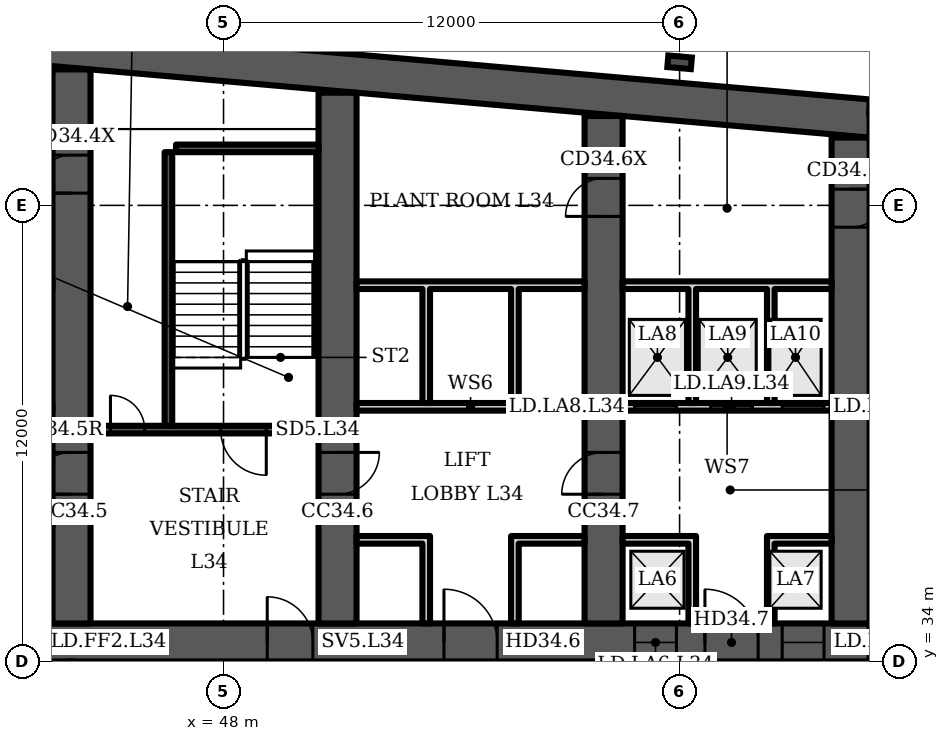
"""IFC4 building model, lengths in metres.
Left out: names, types, materials, properties, quantities, classifications, styles, units other than length and angle.
Written with IfcOpenShell. Run it as: python <this file> out.ifc"""

import sys

from ifc_helpers import new_model, si_unit, direction, frame, frame_2d, origin, origin_2d, place, context, subcontext, project, spatial, polyline, rectangle, i_section, outline, extrude, element, fill, save


model = new_model("IFC4")
c1 = context("Model", 3, precision=1e-05, world=origin(), true_north=direction((0.0, 1.0)))
c2 = subcontext(c1, "Body", "Model", "MODEL_VIEW")
j1 = project(units=[si_unit("LENGTHUNIT", "METRE"), si_unit("PLANEANGLEUNIT", "RADIAN")], contexts=[c1])
p1 = place(None, origin())
s1 = spatial("IfcSite", under=j1, at=p1, CompositionType="ELEMENT")
p2 = place(p1, origin())
s2 = spatial("IfcBuilding", under=s1, at=p2, CompositionType="ELEMENT")
p3 = place(p2, frame((0.0, 0.0, 143.5)))
s3 = spatial("IfcBuildingStorey", under=s2, at=p3, CompositionType="ELEMENT", Elevation=143.5)
p4 = place(p3, origin())
e1 = element("IfcWall", 1, at=p4, inside=s3, PredefinedType="SHEAR", context=c2, shape_type="SweptSolid", body=[
    extrude(outline(polyline([(16.0, 47.784), (40.5, 49.927), (65.0, 47.784), (65.0, 48.787), (40.5, 50.931), (16.0, 48.787), (16.0, 47.784)])), origin(), (0.0, 0.0, 1.0), 3.6),
])
p5 = place(p3, frame((16.0, 34.5, 0.0), z_axis=(0.0, 0.0, 1.0), x_axis=(1.0, 0.0, 0.0)))
e2 = element("IfcWall", 2, at=p5, inside=s3, PredefinedType="SHEAR", context=c2, shape_type="SweptSolid", body=[
    extrude(rectangle(XDim=49.0, YDim=1.0, at=frame_2d((24.5, 0.0))), origin(), (0.0, 0.0, 1.0), 3.6),
])
p6 = place(p5, frame((1.2, 0.0, 0.0)))
e3 = element("IfcOpeningElement", 3, at=p6, cuts=e2, PredefinedType="OPENING", context=c2, shape_type="SweptSolid", body=[
    extrude(rectangle(XDim=1.1, YDim=2.1, at=frame_2d((0.55, 1.05))), frame((0.0, 0.51, 0.0), z_axis=(0.0, -1.0, 0.0), x_axis=(1.0, 0.0, 0.0)), (0.0, 0.0, 1.0), 1.02),
])
p7 = place(p5, frame((5.083, 0.0, 0.0)))
e4 = element("IfcOpeningElement", 4, at=p7, cuts=e2, PredefinedType="OPENING", context=c2, shape_type="SweptSolid", body=[
    extrude(rectangle(XDim=1.1, YDim=2.1, at=frame_2d((0.55, 1.05))), frame((0.0, 0.51, 0.0), z_axis=(0.0, -1.0, 0.0), x_axis=(1.0, 0.0, 0.0)), (0.0, 0.0, 1.0), 1.02),
])
p8 = place(p5, frame((2.933, 0.0, 0.0)))
e5 = element("IfcOpeningElement", 5, at=p8, cuts=e2, PredefinedType="OPENING", context=c2, shape_type="SweptSolid", body=[
    extrude(rectangle(XDim=1.4, YDim=2.1, at=frame_2d((0.7, 1.05))), frame((0.0, 0.51, 0.0), z_axis=(0.0, -1.0, 0.0), x_axis=(1.0, 0.0, 0.0)), (0.0, 0.0, 1.0), 1.02),
])
p9 = place(p5, frame((7.65, 0.0, 0.0)))
e6 = element("IfcOpeningElement", 6, at=p9, cuts=e2, PredefinedType="OPENING", context=c2, shape_type="SweptSolid", body=[
    extrude(rectangle(XDim=1.2, YDim=2.1, at=frame_2d((0.6, 1.05))), frame((0.0, 0.51, 0.0), z_axis=(0.0, -1.0, 0.0), x_axis=(1.0, 0.0, 0.0)), (0.0, 0.0, 1.0), 1.02),
])
p10 = place(p5, frame((14.817, 0.0, 0.0)))
e7 = element("IfcOpeningElement", 7, at=p10, cuts=e2, PredefinedType="OPENING", context=c2, shape_type="SweptSolid", body=[
    extrude(rectangle(XDim=1.1, YDim=2.1, at=frame_2d((0.55, 1.05))), frame((0.0, 0.51, 0.0), z_axis=(0.0, -1.0, 0.0), x_axis=(1.0, 0.0, 0.0)), (0.0, 0.0, 1.0), 1.02),
])
p11 = place(p5, frame((19.083, 0.0, 0.0)))
e8 = element("IfcOpeningElement", 8, at=p11, cuts=e2, PredefinedType="OPENING", context=c2, shape_type="SweptSolid", body=[
    extrude(rectangle(XDim=1.1, YDim=2.1, at=frame_2d((0.55, 1.05))), frame((0.0, 0.51, 0.0), z_axis=(0.0, -1.0, 0.0), x_axis=(1.0, 0.0, 0.0)), (0.0, 0.0, 1.0), 1.02),
])
p12 = place(p5, frame((16.8, 0.0, 0.0)))
e9 = element("IfcOpeningElement", 9, at=p12, cuts=e2, PredefinedType="OPENING", context=c2, shape_type="SweptSolid", body=[
    extrude(rectangle(XDim=1.4, YDim=2.1, at=frame_2d((0.7, 1.05))), frame((0.0, 0.51, 0.0), z_axis=(0.0, -1.0, 0.0), x_axis=(1.0, 0.0, 0.0)), (0.0, 0.0, 1.0), 1.02),
])
p13 = place(p5, frame((21.817, 0.0, 0.0)))
e10 = element("IfcOpeningElement", 10, at=p13, cuts=e2, PredefinedType="OPENING", context=c2, shape_type="SweptSolid", body=[
    extrude(rectangle(XDim=1.1, YDim=2.1, at=frame_2d((0.55, 1.05))), frame((0.0, 0.51, 0.0), z_axis=(0.0, -1.0, 0.0), x_axis=(1.0, 0.0, 0.0)), (0.0, 0.0, 1.0), 1.02),
])
p14 = place(p5, frame((26.083, 0.0, 0.0)))
e11 = element("IfcOpeningElement", 11, at=p14, cuts=e2, PredefinedType="OPENING", context=c2, shape_type="SweptSolid", body=[
    extrude(rectangle(XDim=1.1, YDim=2.1, at=frame_2d((0.55, 1.05))), frame((0.0, 0.51, 0.0), z_axis=(0.0, -1.0, 0.0), x_axis=(1.0, 0.0, 0.0)), (0.0, 0.0, 1.0), 1.02),
])
p15 = place(p5, frame((33.15, 0.0, 0.0)))
e12 = element("IfcOpeningElement", 12, at=p15, cuts=e2, PredefinedType="OPENING", context=c2, shape_type="SweptSolid", body=[
    extrude(rectangle(XDim=1.2, YDim=2.1, at=frame_2d((0.6, 1.05))), frame((0.0, 0.51, 0.0), z_axis=(0.0, -1.0, 0.0), x_axis=(1.0, 0.0, 0.0)), (0.0, 0.0, 1.0), 1.02),
])
p16 = place(p5, frame((37.8, 0.0, 0.0)))
e13 = element("IfcOpeningElement", 13, at=p16, cuts=e2, PredefinedType="OPENING", context=c2, shape_type="SweptSolid", body=[
    extrude(rectangle(XDim=1.4, YDim=2.1, at=frame_2d((0.7, 1.05))), frame((0.0, 0.51, 0.0), z_axis=(0.0, -1.0, 0.0), x_axis=(1.0, 0.0, 0.0)), (0.0, 0.0, 1.0), 1.02),
])
p17 = place(p5, frame((42.817, 0.0, 0.0)))
e14 = element("IfcOpeningElement", 14, at=p17, cuts=e2, PredefinedType="OPENING", context=c2, shape_type="SweptSolid", body=[
    extrude(rectangle(XDim=1.1, YDim=2.1, at=frame_2d((0.55, 1.05))), frame((0.0, 0.51, 0.0), z_axis=(0.0, -1.0, 0.0), x_axis=(1.0, 0.0, 0.0)), (0.0, 0.0, 1.0), 1.02),
])
p18 = place(p5, frame((46.7, 0.0, 0.0)))
e15 = element("IfcOpeningElement", 15, at=p18, cuts=e2, PredefinedType="OPENING", context=c2, shape_type="SweptSolid", body=[
    extrude(rectangle(XDim=1.1, YDim=2.1, at=frame_2d((0.55, 1.05))), frame((0.0, 0.51, 0.0), z_axis=(0.0, -1.0, 0.0), x_axis=(1.0, 0.0, 0.0)), (0.0, 0.0, 1.0), 1.02),
])
p19 = place(p5, frame((44.667, 0.0, 0.0)))
e16 = element("IfcOpeningElement", 16, at=p19, cuts=e2, PredefinedType="OPENING", context=c2, shape_type="SweptSolid", body=[
    extrude(rectangle(XDim=1.4, YDim=2.1, at=frame_2d((0.7, 1.05))), frame((0.0, 0.51, 0.0), z_axis=(0.0, -1.0, 0.0), x_axis=(1.0, 0.0, 0.0)), (0.0, 0.0, 1.0), 1.02),
])
p20 = place(p3, frame((44.0, 35.0, 0.0), z_axis=(0.0, 0.0, 1.0), x_axis=(0.0, 1.0, 0.0)))
e17 = element("IfcWall", 17, at=p20, inside=s3, PredefinedType="SHEAR", context=c2, shape_type="SweptSolid", body=[
    extrude(rectangle(XDim=14.577, YDim=1.0, at=frame_2d((7.289, 0.0))), origin(), (0.0, 0.0, 1.0), 3.6),
])
p21 = place(p20, frame((11.322, 0.0, 0.0)))
e18 = element("IfcOpeningElement", 18, at=p21, cuts=e17, PredefinedType="OPENING", context=c2, shape_type="SweptSolid", body=[
    extrude(rectangle(XDim=1.0, YDim=2.1, at=frame_2d((0.5, 1.05))), frame((0.0, 0.51, 0.0), z_axis=(0.0, -1.0, 0.0), x_axis=(1.0, 0.0, 0.0)), (0.0, 0.0, 1.0), 1.02),
])
p22 = place(p20, frame((3.4, 0.0, 0.0)))
e19 = element("IfcOpeningElement", 19, at=p22, cuts=e17, PredefinedType="OPENING", context=c2, shape_type="SweptSolid", body=[
    extrude(rectangle(XDim=1.1, YDim=2.1, at=frame_2d((0.55, 1.05))), frame((0.0, 0.51, 0.0), z_axis=(0.0, -1.0, 0.0), x_axis=(1.0, 0.0, 0.0)), (0.0, 0.0, 1.0), 1.02),
])
p23 = place(p3, frame((51.0, 35.0, 0.0), z_axis=(0.0, 0.0, 1.0), x_axis=(0.0, 1.0, 0.0)))
e20 = element("IfcWall", 20, at=p23, inside=s3, PredefinedType="SHEAR", context=c2, shape_type="SweptSolid", body=[
    extrude(rectangle(XDim=13.965, YDim=1.0, at=frame_2d((6.982, 0.0))), origin(), (0.0, 0.0, 1.0), 3.6),
])
p24 = place(p23, frame((3.4, 0.0, 0.0)))
e21 = element("IfcOpeningElement", 21, at=p24, cuts=e20, PredefinedType="OPENING", context=c2, shape_type="SweptSolid", body=[
    extrude(rectangle(XDim=1.1, YDim=2.1, at=frame_2d((0.55, 1.05))), frame((0.0, 0.51, 0.0), z_axis=(0.0, -1.0, 0.0), x_axis=(1.0, 0.0, 0.0)), (0.0, 0.0, 1.0), 1.02),
])
p25 = place(p3, frame((58.0, 35.0, 0.0), z_axis=(0.0, 0.0, 1.0), x_axis=(0.0, 1.0, 0.0)))
e22 = element("IfcWall", 22, at=p25, inside=s3, PredefinedType="SHEAR", context=c2, shape_type="SweptSolid", body=[
    extrude(rectangle(XDim=13.352, YDim=1.0, at=frame_2d((6.676, 0.0))), origin(), (0.0, 0.0, 1.0), 3.6),
])
p26 = place(p25, frame((10.71, 0.0, 0.0)))
e23 = element("IfcOpeningElement", 23, at=p26, cuts=e22, PredefinedType="OPENING", context=c2, shape_type="SweptSolid", body=[
    extrude(rectangle(XDim=1.0, YDim=2.1, at=frame_2d((0.5, 1.05))), frame((0.0, 0.51, 0.0), z_axis=(0.0, -1.0, 0.0), x_axis=(1.0, 0.0, 0.0)), (0.0, 0.0, 1.0), 1.02),
])
p27 = place(p25, frame((3.4, 0.0, 0.0)))
e24 = element("IfcOpeningElement", 24, at=p27, cuts=e22, PredefinedType="OPENING", context=c2, shape_type="SweptSolid", body=[
    extrude(rectangle(XDim=1.1, YDim=2.1, at=frame_2d((0.55, 1.05))), frame((0.0, 0.51, 0.0), z_axis=(0.0, -1.0, 0.0), x_axis=(1.0, 0.0, 0.0)), (0.0, 0.0, 1.0), 1.02),
])
p28 = place(p3, frame((64.5, 35.0, 0.0), z_axis=(0.0, 0.0, 1.0), x_axis=(0.0, 1.0, 0.0)))
e25 = element("IfcWall", 25, at=p28, inside=s3, PredefinedType="SHEAR", context=c2, shape_type="SweptSolid", body=[
    extrude(rectangle(XDim=12.784, YDim=1.0, at=frame_2d((6.392, 0.0))), origin(), (0.0, 0.0, 1.0), 3.6),
])
p29 = place(p28, frame((10.426, 0.0, 0.0)))
e26 = element("IfcOpeningElement", 26, at=p29, cuts=e25, PredefinedType="OPENING", context=c2, shape_type="SweptSolid", body=[
    extrude(rectangle(XDim=1.0, YDim=2.1, at=frame_2d((0.5, 1.05))), frame((0.0, 0.51, 0.0), z_axis=(0.0, -1.0, 0.0), x_axis=(1.0, 0.0, 0.0)), (0.0, 0.0, 1.0), 1.02),
])
p30 = place(p3, frame((60.0, 49.765, 0.0), z_axis=(0.0, 0.0, 1.0), x_axis=(0.087156, 0.996198, 0.0)))
e27 = element("IfcColumn", 27, at=p30, inside=s3, PredefinedType="COLUMN", context=c2, shape_type="SweptSolid", body=[
    extrude(i_section(OverallWidth=0.305, OverallDepth=0.62, WebThickness=0.021, FlangeThickness=0.04, FilletRadius=0.027, at=origin_2d()), origin(), (0.0, 0.0, 1.0), 3.6),
])
p31 = place(p3, frame((67.983, 48.326, 0.0), z_axis=(0.0, 0.0, 1.0), x_axis=(-0.996194, 0.087168, 0.0)))
e28 = element("IfcWall", 28, at=p31, inside=s3, PredefinedType="SOLIDWALL", context=c2, shape_type="SweptSolid", body=[
    extrude(rectangle(XDim=2.994, YDim=0.4, at=frame_2d((1.497, 0.0))), origin(), (0.0, 0.0, 1.0), 3.15),
])
p32 = place(p3, frame((44.5, 40.1, 0.0), z_axis=(0.0, 0.0, 1.0), x_axis=(1.0, 0.0, 0.0)))
e29 = element("IfcWall", 29, at=p32, inside=s3, PredefinedType="SHEAR", context=c2, shape_type="SweptSolid", body=[
    extrude(rectangle(XDim=6.0, YDim=0.2, at=frame_2d((3.0, 0.0))), origin(), (0.0, 0.0, 1.0), 3.15),
])
p33 = place(p32, frame((3.425, 0.0, 0.0)))
e30 = element("IfcOpeningElement", 30, at=p33, cuts=e29, PredefinedType="OPENING", context=c2, shape_type="SweptSolid", body=[
    extrude(rectangle(XDim=1.2, YDim=2.1, at=frame_2d((0.6, 1.05))), frame((0.0, 0.11, 0.0), z_axis=(0.0, -1.0, 0.0), x_axis=(1.0, 0.0, 0.0)), (0.0, 0.0, 1.0), 0.22),
])
p34 = place(p32, frame((0.525, 0.0, 0.0)))
e31 = element("IfcOpeningElement", 31, at=p34, cuts=e29, PredefinedType="OPENING", context=c2, shape_type="SweptSolid", body=[
    extrude(rectangle(XDim=0.9, YDim=2.1, at=frame_2d((0.45, 1.05))), frame((0.0, 0.11, 0.0), z_axis=(0.0, -1.0, 0.0), x_axis=(1.0, 0.0, 0.0)), (0.0, 0.0, 1.0), 0.22),
])
p35 = place(p3, frame((46.55, 40.2, 0.0), z_axis=(0.0, 0.0, 1.0), x_axis=(0.0, 1.0, 0.0)))
e32 = element("IfcWall", 32, at=p35, inside=s3, PredefinedType="SHEAR", context=c2, shape_type="SweptSolid", body=[
    extrude(rectangle(XDim=7.2, YDim=0.2, at=frame_2d((3.6, 0.0))), origin(), (0.0, 0.0, 1.0), 3.15),
])
p36 = place(p3, frame((46.75, 47.5, 0.0), z_axis=(0.0, 0.0, 1.0), x_axis=(1.0, 0.0, 0.0)))
e33 = element("IfcWall", 33, at=p36, inside=s3, PredefinedType="SHEAR", context=c2, shape_type="SweptSolid", body=[
    extrude(rectangle(XDim=3.75, YDim=0.2, at=frame_2d((1.875, 0.0))), origin(), (0.0, 0.0, 1.0), 3.15),
])
p37 = place(p3, frame((51.5, 40.7, 0.0), z_axis=(0.0, 0.0, 1.0), x_axis=(1.0, 0.0, 0.0)))
e34 = element("IfcWall", 34, at=p37, inside=s3, PredefinedType="PARTITIONING", context=c2, shape_type="SweptSolid", body=[
    extrude(rectangle(XDim=6.0, YDim=0.2, at=frame_2d((3.0, 0.0))), origin(), (0.0, 0.0, 1.0), 3.15),
])
p38 = place(p3, frame((0.0, 0.0, -0.0)))
e35 = element("IfcWall", 35, at=p38, inside=s3, PredefinedType="PARTITIONING", context=c2, shape_type="SweptSolid", body=[
    extrude(outline(polyline([(53.233, 37.1), (51.5, 37.1), (51.5, 37.3), (53.233, 37.3), (53.433, 37.3), (53.433, 35.0), (53.233, 35.0), (53.233, 37.1)])), origin(), (0.0, 0.0, 1.0), 3.15),
])
p39 = place(p3, frame((0.0, 0.0, -0.0)))
e36 = element("IfcWall", 36, at=p39, inside=s3, PredefinedType="PARTITIONING", context=c2, shape_type="SweptSolid", body=[
    extrude(outline(polyline([(55.567, 37.3), (55.767, 37.3), (57.5, 37.3), (57.5, 37.1), (55.767, 37.1), (55.767, 35.0), (55.567, 35.0), (55.567, 37.3)])), origin(), (0.0, 0.0, 1.0), 3.15),
])
p40 = place(p3, frame((0.0, 0.0, -0.0)))
e37 = element("IfcWall", 37, at=p40, inside=s3, PredefinedType="PARTITIONING", context=c2, shape_type="SweptSolid", body=[
    extrude(outline(polyline([(53.433, 40.8), (53.233, 40.8), (53.233, 43.8), (51.5, 43.8), (51.5, 44.0), (57.5, 44.0), (57.5, 43.8), (55.767, 43.8), (55.767, 40.8), (55.567, 40.8), (55.567, 43.8), (53.433, 43.8), (53.433, 40.8)])), origin(), (0.0, 0.0, 1.0), 3.15),
])
p41 = place(p3, frame((58.5, 40.7, 0.0), z_axis=(0.0, 0.0, 1.0), x_axis=(1.0, 0.0, 0.0)))
e38 = element("IfcWall", 38, at=p41, inside=s3, PredefinedType="PARTITIONING", context=c2, shape_type="SweptSolid", body=[
    extrude(rectangle(XDim=5.5, YDim=0.2, at=frame_2d((2.75, 0.0))), origin(), (0.0, 0.0, 1.0), 3.15),
])
p42 = place(p41, frame((0.317, 0.0, 0.0)))
e39 = element("IfcOpeningElement", 39, at=p42, cuts=e38, PredefinedType="OPENING", context=c2, shape_type="SweptSolid", body=[
    extrude(rectangle(XDim=1.1, YDim=2.1, at=frame_2d((0.55, 1.05))), frame((0.0, 0.11, 0.0), z_axis=(0.0, -1.0, 0.0), x_axis=(1.0, 0.0, 0.0)), (0.0, 0.0, 1.0), 0.22),
])
p43 = place(p41, frame((2.317, 0.0, 0.0)))
e40 = element("IfcOpeningElement", 40, at=p43, cuts=e38, PredefinedType="OPENING", context=c2, shape_type="SweptSolid", body=[
    extrude(rectangle(XDim=1.1, YDim=2.1, at=frame_2d((0.55, 1.05))), frame((0.0, 0.11, 0.0), z_axis=(0.0, -1.0, 0.0), x_axis=(1.0, 0.0, 0.0)), (0.0, 0.0, 1.0), 0.22),
])
p44 = place(p41, frame((4.2, 0.0, 0.0)))
e41 = element("IfcOpeningElement", 41, at=p44, cuts=e38, PredefinedType="OPENING", context=c2, shape_type="SweptSolid", body=[
    extrude(rectangle(XDim=1.1, YDim=2.1, at=frame_2d((0.55, 1.05))), frame((0.0, 0.11, 0.0), z_axis=(0.0, -1.0, 0.0), x_axis=(1.0, 0.0, 0.0)), (0.0, 0.0, 1.0), 0.22),
])
p45 = place(p3, frame((0.0, 0.0, -0.0)))
e42 = element("IfcWall", 42, at=p45, inside=s3, PredefinedType="PARTITIONING", context=c2, shape_type="SweptSolid", body=[
    extrude(outline(polyline([(60.233, 37.1), (58.5, 37.1), (58.5, 37.3), (60.233, 37.3), (60.433, 37.3), (60.433, 35.0), (60.233, 35.0), (60.233, 37.1)])), origin(), (0.0, 0.0, 1.0), 3.15),
])
p46 = place(p3, frame((0.0, 0.0, -0.0)))
e43 = element("IfcWall", 43, at=p46, inside=s3, PredefinedType="PARTITIONING", context=c2, shape_type="SweptSolid", body=[
    extrude(outline(polyline([(62.3, 37.3), (62.5, 37.3), (64.0, 37.3), (64.0, 37.1), (62.5, 37.1), (62.5, 35.0), (62.3, 35.0), (62.3, 37.3)])), origin(), (0.0, 0.0, 1.0), 3.15),
])
p47 = place(p3, frame((0.0, 0.0, -0.0)))
e44 = element("IfcWall", 44, at=p47, inside=s3, PredefinedType="PARTITIONING", context=c2, shape_type="SweptSolid", body=[
    extrude(outline(polyline([(60.433, 40.8), (60.233, 40.8), (60.233, 43.8), (58.5, 43.8), (58.5, 44.0), (64.0, 44.0), (64.0, 43.8), (62.5, 43.8), (62.5, 40.8), (62.3, 40.8), (62.3, 43.8), (60.433, 43.8), (60.433, 40.8)])), origin(), (0.0, 0.0, 1.0), 3.15),
])
p48 = place(p21, origin())
e45 = element("IfcDoor", 45, at=p48, inside=s3, OperationType="SINGLE_SWING_LEFT", PredefinedType="DOOR", context=c2, shape_type="SweptSolid", body=[
    extrude(rectangle(XDim=1.0, YDim=2.1, at=frame_2d((0.5, 1.05))), frame((0.0, 0.5, 0.0), z_axis=(0.0, -1.0, 0.0), x_axis=(1.0, 0.0, 0.0)), (0.0, 0.0, 1.0), 1.0),
])
fill(e18, e45)
p49 = place(p33, origin())
e46 = element("IfcDoor", 46, at=p49, inside=s3, OperationType="SINGLE_SWING_RIGHT", PredefinedType="DOOR", context=c2, shape_type="SweptSolid", body=[
    extrude(rectangle(XDim=1.2, YDim=2.1, at=frame_2d((0.6, 1.05))), frame((0.0, 0.025, 0.0), z_axis=(0.0, -1.0, 0.0), x_axis=(1.0, 0.0, 0.0)), (0.0, 0.0, 1.0), 0.05),
])
fill(e30, e46)
p50 = place(p34, origin())
e47 = element("IfcDoor", 47, at=p50, inside=s3, OperationType="SINGLE_SWING_LEFT", PredefinedType="DOOR", context=c2, shape_type="SweptSolid", body=[
    extrude(rectangle(XDim=0.9, YDim=2.1, at=frame_2d((0.45, 1.05))), frame((0.0, 0.025, 0.0), z_axis=(0.0, -1.0, 0.0), x_axis=(1.0, 0.0, 0.0)), (0.0, 0.0, 1.0), 0.05),
])
fill(e31, e47)
p51 = place(p15, origin())
e48 = element("IfcDoor", 48, at=p51, inside=s3, OperationType="SINGLE_SWING_LEFT", PredefinedType="DOOR", context=c2, shape_type="SweptSolid", body=[
    extrude(rectangle(XDim=1.2, YDim=2.1, at=frame_2d((0.6, 1.05))), frame((0.0, 0.025, 0.0), z_axis=(0.0, -1.0, 0.0), x_axis=(1.0, 0.0, 0.0)), (0.0, 0.0, 1.0), 0.05),
])
fill(e12, e48)
p52 = place(p16, origin())
e49 = element("IfcDoor", 49, at=p52, inside=s3, OperationType="DOUBLE_DOOR_SINGLE_SWING", PredefinedType="DOOR", context=c2, shape_type="SweptSolid", body=[
    extrude(rectangle(XDim=1.4, YDim=2.1, at=frame_2d((0.7, 1.05))), frame((0.0, 0.025, 0.0), z_axis=(0.0, -1.0, 0.0), x_axis=(1.0, 0.0, 0.0)), (0.0, 0.0, 1.0), 0.05),
])
fill(e13, e49)
p53 = place(p26, origin())
e50 = element("IfcDoor", 50, at=p53, inside=s3, OperationType="SINGLE_SWING_LEFT", PredefinedType="DOOR", context=c2, shape_type="SweptSolid", body=[
    extrude(rectangle(XDim=1.0, YDim=2.1, at=frame_2d((0.5, 1.05))), frame((0.0, 0.5, 0.0), z_axis=(0.0, -1.0, 0.0), x_axis=(1.0, 0.0, 0.0)), (0.0, 0.0, 1.0), 1.0),
])
fill(e23, e50)
p54 = place(p17, origin())
e51 = element("IfcDoor", 51, at=p54, inside=s3, OperationType="DOUBLE_DOOR_SLIDING", PredefinedType="DOOR", context=c2, shape_type="SweptSolid", body=[
    extrude(rectangle(XDim=1.1, YDim=2.1, at=frame_2d((0.55, 1.05))), frame((0.0, 0.025, 0.0), z_axis=(0.0, -1.0, 0.0), x_axis=(1.0, 0.0, 0.0)), (0.0, 0.0, 1.0), 0.05),
])
fill(e14, e51)
p55 = place(p18, origin())
e52 = element("IfcDoor", 52, at=p55, inside=s3, OperationType="DOUBLE_DOOR_SLIDING", PredefinedType="DOOR", context=c2, shape_type="SweptSolid", body=[
    extrude(rectangle(XDim=1.1, YDim=2.1, at=frame_2d((0.55, 1.05))), frame((0.0, 0.025, 0.0), z_axis=(0.0, -1.0, 0.0), x_axis=(1.0, 0.0, 0.0)), (0.0, 0.0, 1.0), 0.05),
])
fill(e15, e52)
p56 = place(p19, origin())
e53 = element("IfcDoor", 53, at=p56, inside=s3, OperationType="DOUBLE_DOOR_SINGLE_SWING", PredefinedType="DOOR", context=c2, shape_type="SweptSolid", body=[
    extrude(rectangle(XDim=1.4, YDim=2.1, at=frame_2d((0.7, 1.05))), frame((0.0, 0.025, 0.0), z_axis=(0.0, -1.0, 0.0), x_axis=(1.0, 0.0, 0.0)), (0.0, 0.0, 1.0), 0.05),
])
fill(e16, e53)
p57 = place(p42, origin())
e54 = element("IfcDoor", 54, at=p57, inside=s3, OperationType="DOUBLE_DOOR_SLIDING", PredefinedType="DOOR", context=c2, shape_type="SweptSolid", body=[
    extrude(rectangle(XDim=1.1, YDim=2.1, at=frame_2d((0.55, 1.05))), frame((0.0, 0.025, 0.0), z_axis=(0.0, -1.0, 0.0), x_axis=(1.0, 0.0, 0.0)), (0.0, 0.0, 1.0), 0.05),
])
fill(e39, e54)
p58 = place(p43, origin())
e55 = element("IfcDoor", 55, at=p58, inside=s3, OperationType="DOUBLE_DOOR_SLIDING", PredefinedType="DOOR", context=c2, shape_type="SweptSolid", body=[
    extrude(rectangle(XDim=1.1, YDim=2.1, at=frame_2d((0.55, 1.05))), frame((0.0, 0.025, 0.0), z_axis=(0.0, -1.0, 0.0), x_axis=(1.0, 0.0, 0.0)), (0.0, 0.0, 1.0), 0.05),
])
fill(e40, e55)
p59 = place(p44, origin())
e56 = element("IfcDoor", 56, at=p59, inside=s3, OperationType="DOUBLE_DOOR_SLIDING", PredefinedType="DOOR", context=c2, shape_type="SweptSolid", body=[
    extrude(rectangle(XDim=1.1, YDim=2.1, at=frame_2d((0.55, 1.05))), frame((0.0, 0.025, 0.0), z_axis=(0.0, -1.0, 0.0), x_axis=(1.0, 0.0, 0.0)), (0.0, 0.0, 1.0), 0.05),
])
fill(e41, e56)
p60 = place(p29, origin())
e57 = element("IfcDoor", 57, at=p60, inside=s3, OperationType="SINGLE_SWING_RIGHT", PredefinedType="DOOR", context=c2, shape_type="SweptSolid", body=[
    extrude(rectangle(XDim=1.0, YDim=2.1, at=frame_2d((0.5, 1.05))), frame((0.0, 0.5, 0.0), z_axis=(0.0, -1.0, 0.0), x_axis=(1.0, 0.0, 0.0)), (0.0, 0.0, 1.0), 1.0),
])
fill(e26, e57)
p61 = place(p22, origin())
e58 = element("IfcDoor", 58, at=p61, inside=s3, OperationType="SINGLE_SWING_LEFT", PredefinedType="DOOR", context=c2, shape_type="SweptSolid", body=[
    extrude(rectangle(XDim=1.1, YDim=2.1, at=frame_2d((0.55, 1.05))), frame((0.0, 0.025, 0.0), z_axis=(0.0, -1.0, 0.0), x_axis=(1.0, 0.0, 0.0)), (0.0, 0.0, 1.0), 0.05),
])
fill(e19, e58)
p62 = place(p24, origin())
e59 = element("IfcDoor", 59, at=p62, inside=s3, OperationType="SINGLE_SWING_RIGHT", PredefinedType="DOOR", context=c2, shape_type="SweptSolid", body=[
    extrude(rectangle(XDim=1.1, YDim=2.1, at=frame_2d((0.55, 1.05))), frame((0.0, 0.025, 0.0), z_axis=(0.0, -1.0, 0.0), x_axis=(1.0, 0.0, 0.0)), (0.0, 0.0, 1.0), 0.05),
])
fill(e21, e59)
p63 = place(p27, origin())
e60 = element("IfcDoor", 60, at=p63, inside=s3, OperationType="SINGLE_SWING_LEFT", PredefinedType="DOOR", context=c2, shape_type="SweptSolid", body=[
    extrude(rectangle(XDim=1.1, YDim=2.1, at=frame_2d((0.55, 1.05))), frame((0.0, 0.025, 0.0), z_axis=(0.0, -1.0, 0.0), x_axis=(1.0, 0.0, 0.0)), (0.0, 0.0, 1.0), 0.05),
])
fill(e24, e60)
save(model, sys.argv[1])
